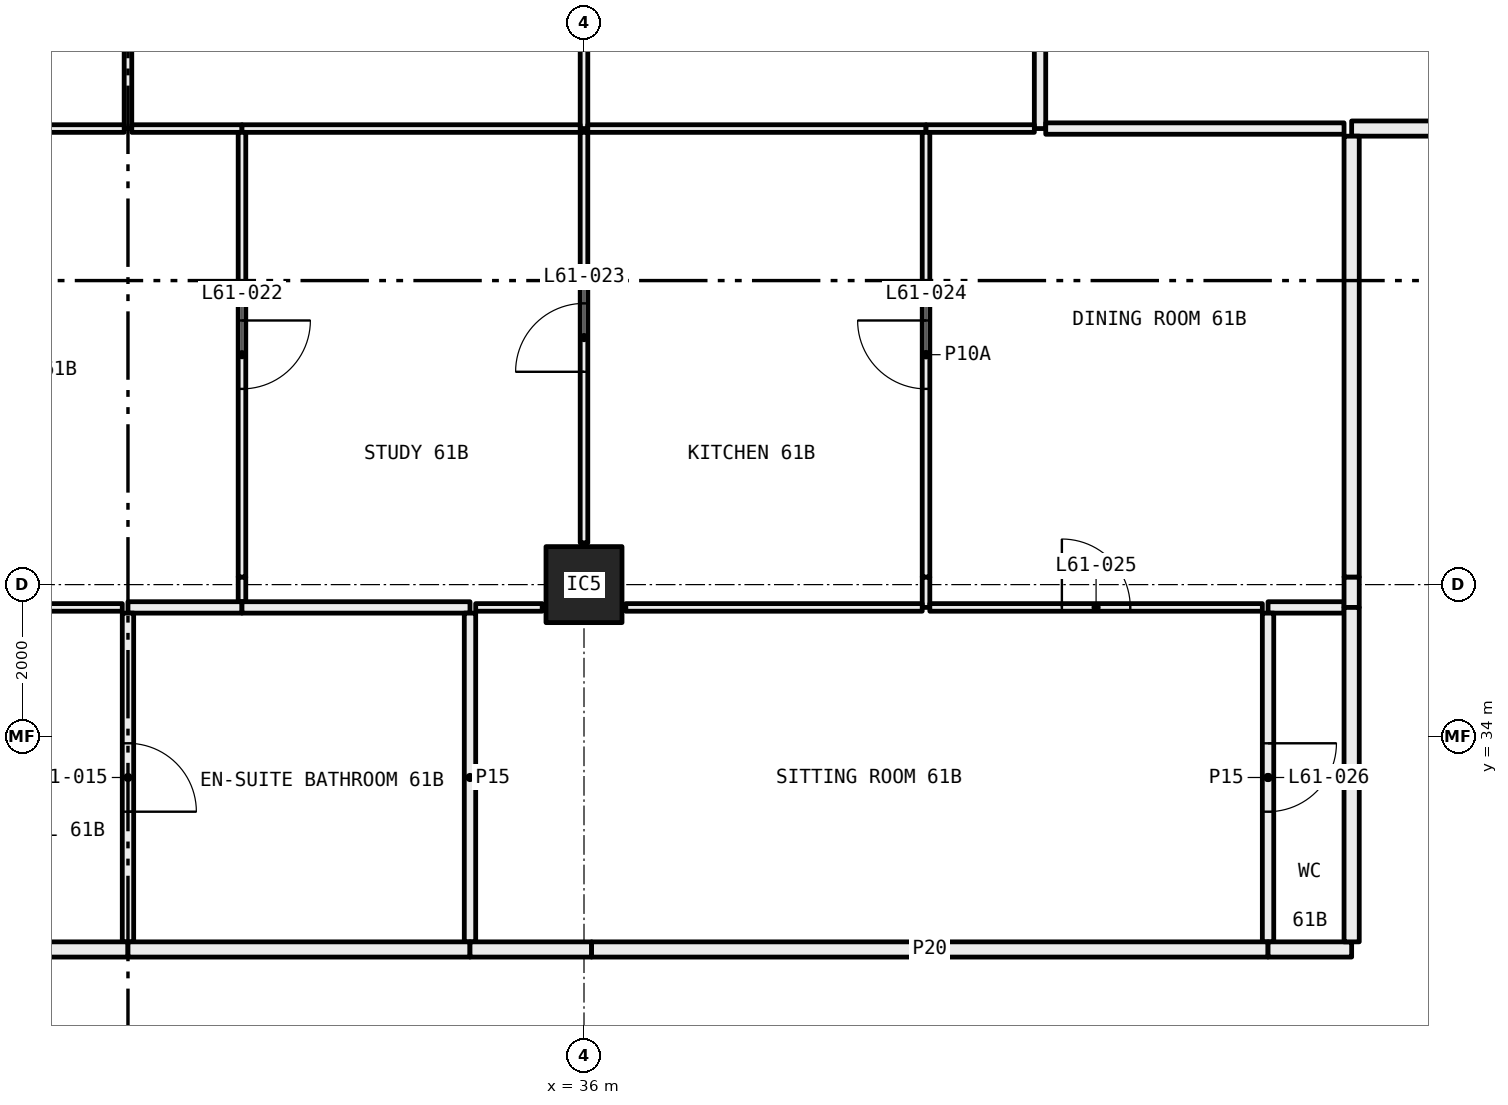
"""IFC4 building model, lengths in metres.
Left out: names, types, materials, properties, quantities, classifications, styles, units other than length and angle.
Written with IfcOpenShell. Run it as: python <this file> out.ifc"""

import sys

from ifc_helpers import new_model, si_unit, direction, frame, frame_2d, origin, origin_2d, place, context, subcontext, project, spatial, rectangle, hollow_rectangle, extrude, element, fill, save


model = new_model("IFC4")
c1 = context("Model", 3, precision=1e-05, world=origin(), true_north=direction((0.0, 1.0)))
c2 = subcontext(c1, "Body", "Model", "MODEL_VIEW")
j1 = project(units=[si_unit("LENGTHUNIT", "METRE"), si_unit("PLANEANGLEUNIT", "RADIAN")], contexts=[c1])
p1 = place(None, origin())
s1 = spatial("IfcSite", under=j1, at=p1, CompositionType="ELEMENT")
p2 = place(p1, origin())
s2 = spatial("IfcBuilding", under=s1, at=p2, CompositionType="ELEMENT")
p3 = place(p2, frame((0.0, 0.0, 228.3)))
s3 = spatial("IfcBuildingStorey", under=s2, at=p3, CompositionType="ELEMENT", Elevation=228.3)
p4 = place(p3, frame((36.0, 36.0, 0.0), z_axis=(0.0, 0.0, 1.0), x_axis=(1.0, 0.0, 0.0)))
e1 = element("IfcColumn", 1, at=p4, inside=s3, PredefinedType="COLUMN", context=c2, shape_type="SweptSolid", body=[
    extrude(hollow_rectangle(XDim=1.0, YDim=1.0, WallThickness=0.04, at=origin_2d()), origin(), (0.0, 0.0, 1.0), 3.05),
])
p5 = place(p3, frame((30.0, 42.0, 0.0), z_axis=(0.0, 0.0, 1.0), x_axis=(0.0, 1.0, 0.0)))
e2 = element("IfcWall", 2, at=p5, inside=s3, PredefinedType="PARTITIONING", context=c2, shape_type="SweptSolid", body=[
    extrude(rectangle(XDim=5.28, YDim=0.1, at=frame_2d((2.64, 0.0))), origin(), (0.0, 0.0, 1.0), 3.05),
])
p6 = place(p5, frame((2.19, 0.0, 0.0)))
e3 = element("IfcOpeningElement", 3, at=p6, cuts=e2, PredefinedType="OPENING", context=c2, shape_type="SweptSolid", body=[
    extrude(rectangle(XDim=0.9, YDim=2.1, at=frame_2d((0.45, 1.05))), frame((0.0, 0.06, 0.0), z_axis=(0.0, -1.0, 0.0), x_axis=(1.0, 0.0, 0.0)), (0.0, 0.0, 1.0), 0.12),
])
p7 = place(p3, frame((26.0, 42.0, 0.0), z_axis=(0.0, 0.0, 1.0), x_axis=(1.0, 0.0, 0.0)))
e4 = element("IfcWall", 4, at=p7, inside=s3, PredefinedType="PARTITIONING", context=c2, shape_type="SweptSolid", body=[
    extrude(rectangle(XDim=3.95, YDim=0.1, at=frame_2d((1.975, 0.0))), origin(), (0.0, 0.0, 1.0), 3.05),
])
p8 = place(p7, frame((1.525, 0.0, 0.0)))
e5 = element("IfcOpeningElement", 5, at=p8, cuts=e4, PredefinedType="OPENING", context=c2, shape_type="SweptSolid", body=[
    extrude(rectangle(XDim=0.9, YDim=2.1, at=frame_2d((0.45, 1.05))), frame((0.0, 0.06, 0.0), z_axis=(0.0, -1.0, 0.0), x_axis=(1.0, 0.0, 0.0)), (0.0, 0.0, 1.0), 0.12),
])
p9 = place(p3, frame((36.0, 42.0, 0.0), z_axis=(0.0, 0.0, 1.0), x_axis=(0.0, 1.0, 0.0)))
e6 = element("IfcWall", 6, at=p9, inside=s3, PredefinedType="PARTITIONING", context=c2, shape_type="SweptSolid", body=[
    extrude(rectangle(XDim=5.28, YDim=0.1, at=frame_2d((2.64, 0.0))), origin(), (0.0, 0.0, 1.0), 2.45),
])
p10 = place(p9, frame((2.19, 0.0, 0.0)))
e7 = element("IfcOpeningElement", 7, at=p10, cuts=e6, PredefinedType="OPENING", context=c2, shape_type="SweptSolid", body=[
    extrude(rectangle(XDim=0.9, YDim=2.1, at=frame_2d((0.45, 1.05))), frame((0.0, 0.06, 0.0), z_axis=(0.0, -1.0, 0.0), x_axis=(1.0, 0.0, 0.0)), (0.0, 0.0, 1.0), 0.12),
])
p11 = place(p3, frame((30.05, 42.0, 0.0), z_axis=(0.0, 0.0, 1.0), x_axis=(1.0, 0.0, 0.0)))
e8 = element("IfcWall", 8, at=p11, inside=s3, PredefinedType="PARTITIONING", context=c2, shape_type="SweptSolid", body=[
    extrude(rectangle(XDim=1.45, YDim=0.1, at=frame_2d((0.725, 0.0))), origin(), (0.0, 0.0, 1.0), 3.05),
])
p12 = place(p3, frame((31.5, 42.0, 0.0), z_axis=(0.0, 0.0, 1.0), x_axis=(1.0, 0.0, 0.0)))
e9 = element("IfcWall", 9, at=p12, inside=s3, PredefinedType="PARTITIONING", context=c2, shape_type="SweptSolid", body=[
    extrude(rectangle(XDim=4.45, YDim=0.1, at=frame_2d((2.225, 0.0))), origin(), (0.0, 0.0, 1.0), 2.45),
])
p13 = place(p3, frame((42.0, 42.0, 0.0), z_axis=(0.0, 0.0, 1.0), x_axis=(0.0, 1.0, 0.0)))
e10 = element("IfcWall", 10, at=p13, inside=s3, PredefinedType="PARTITIONING", context=c2, shape_type="SweptSolid", body=[
    extrude(rectangle(XDim=3.0, YDim=0.15, at=frame_2d((1.5, 0.0))), origin(), (0.0, 0.0, 1.0), 3.05),
])
p14 = place(p13, frame((1.05, 0.0, 0.0)))
e11 = element("IfcOpeningElement", 11, at=p14, cuts=e10, PredefinedType="OPENING", context=c2, shape_type="SweptSolid", body=[
    extrude(rectangle(XDim=0.9, YDim=2.1, at=frame_2d((0.45, 1.05))), frame((0.0, 0.085, 0.0), z_axis=(0.0, -1.0, 0.0), x_axis=(1.0, 0.0, 0.0)), (0.0, 0.0, 1.0), 0.17),
])
p15 = place(p3, frame((36.05, 42.0, 0.0), z_axis=(0.0, 0.0, 1.0), x_axis=(1.0, 0.0, 0.0)))
e12 = element("IfcWall", 12, at=p15, inside=s3, PredefinedType="PARTITIONING", context=c2, shape_type="SweptSolid", body=[
    extrude(rectangle(XDim=4.45, YDim=0.1, at=frame_2d((2.225, 0.0))), origin(), (0.0, 0.0, 1.0), 2.45),
])
p16 = place(p3, frame((40.5, 42.0, 0.0), z_axis=(0.0, 0.0, 1.0), x_axis=(1.0, 0.0, 0.0)))
e13 = element("IfcWall", 13, at=p16, inside=s3, PredefinedType="PARTITIONING", context=c2, shape_type="SweptSolid", body=[
    extrude(rectangle(XDim=1.425, YDim=0.1, at=frame_2d((0.712, 0.0))), origin(), (0.0, 0.0, 1.0), 3.05),
])
p17 = place(p3, frame((42.075, 42.0, 0.0), z_axis=(0.0, 0.0, 1.0), x_axis=(1.0, 0.0, 0.0)))
e14 = element("IfcWall", 14, at=p17, inside=s3, PredefinedType="PARTITIONING", context=c2, shape_type="SweptSolid", body=[
    extrude(rectangle(XDim=3.925, YDim=0.15, at=frame_2d((1.962, 0.0))), origin(), (0.0, 0.0, 1.0), 3.05),
])
p18 = place(p3, frame((46.1, 42.0, 0.0), z_axis=(0.0, 0.0, 1.0), x_axis=(1.0, 0.0, 0.0)))
e15 = element("IfcWall", 15, at=p18, inside=s3, PredefinedType="PARTITIONING", context=c2, shape_type="SweptSolid", body=[
    extrude(rectangle(XDim=1.8, YDim=0.2, at=frame_2d((0.9, 0.0))), origin(), (0.0, 0.0, 1.0), 3.05),
])
p19 = place(p3, frame((31.5, 35.775, 0.0), z_axis=(0.0, 0.0, 1.0), x_axis=(0.0, 1.0, 0.0)))
e16 = element("IfcWall", 16, at=p19, inside=s3, PredefinedType="PARTITIONING", context=c2, shape_type="SweptSolid", body=[
    extrude(rectangle(XDim=0.325, YDim=0.1, at=frame_2d((0.163, 0.0))), origin(), (0.0, 0.0, 1.0), 2.45),
])
p20 = place(p3, frame((31.5, 36.1, 0.0), z_axis=(0.0, 0.0, 1.0), x_axis=(0.0, 1.0, 0.0)))
e17 = element("IfcWall", 17, at=p20, inside=s3, PredefinedType="PARTITIONING", context=c2, shape_type="SweptSolid", body=[
    extrude(rectangle(XDim=5.85, YDim=0.1, at=frame_2d((2.925, 0.0))), origin(), (0.0, 0.0, 1.0), 3.05),
])
p21 = place(p20, frame((2.475, 0.0, 0.0)))
e18 = element("IfcOpeningElement", 18, at=p21, cuts=e17, PredefinedType="OPENING", context=c2, shape_type="SweptSolid", body=[
    extrude(rectangle(XDim=0.9, YDim=2.1, at=frame_2d((0.45, 1.05))), frame((0.0, 0.06, 0.0), z_axis=(0.0, -1.0, 0.0), x_axis=(1.0, 0.0, 0.0)), (0.0, 0.0, 1.0), 0.12),
])
p22 = place(p3, frame((26.0, 35.7, 0.0), z_axis=(0.0, 0.0, 1.0), x_axis=(1.0, 0.0, 0.0)))
e19 = element("IfcWall", 19, at=p22, inside=s3, PredefinedType="PARTITIONING", context=c2, shape_type="SweptSolid", body=[
    extrude(rectangle(XDim=3.925, YDim=0.1, at=frame_2d((1.962, 0.0))), origin(), (0.0, 0.0, 1.0), 3.05),
])
p23 = place(p22, frame((1.512, 0.0, 0.0)))
e20 = element("IfcOpeningElement", 20, at=p23, cuts=e19, PredefinedType="OPENING", context=c2, shape_type="SweptSolid", body=[
    extrude(rectangle(XDim=0.9, YDim=2.1, at=frame_2d((0.45, 1.05))), frame((0.0, 0.06, 0.0), z_axis=(0.0, -1.0, 0.0), x_axis=(1.0, 0.0, 0.0)), (0.0, 0.0, 1.0), 0.12),
])
p24 = place(p3, frame((30.0, 35.7, 0.0), z_axis=(0.0, 0.0, 1.0), x_axis=(1.0, 0.0, 0.0)))
e21 = element("IfcWall", 21, at=p24, inside=s3, PredefinedType="PARTITIONING", context=c2, shape_type="SweptSolid", body=[
    extrude(rectangle(XDim=1.5, YDim=0.15, at=frame_2d((0.75, 0.0))), origin(), (0.0, 0.0, 1.0), 3.05),
])
p25 = place(p3, frame((36.0, 36.55, 0.0), z_axis=(0.0, 0.0, 1.0), x_axis=(0.0, 1.0, 0.0)))
e22 = element("IfcWall", 22, at=p25, inside=s3, PredefinedType="PARTITIONING", context=c2, shape_type="SweptSolid", body=[
    extrude(rectangle(XDim=5.4, YDim=0.1, at=frame_2d((2.7, 0.0))), origin(), (0.0, 0.0, 1.0), 2.45),
])
p26 = place(p25, frame((2.25, 0.0, 0.0)))
e23 = element("IfcOpeningElement", 23, at=p26, cuts=e22, PredefinedType="OPENING", context=c2, shape_type="SweptSolid", body=[
    extrude(rectangle(XDim=0.9, YDim=2.1, at=frame_2d((0.45, 1.05))), frame((0.0, 0.06, 0.0), z_axis=(0.0, -1.0, 0.0), x_axis=(1.0, 0.0, 0.0)), (0.0, 0.0, 1.0), 0.12),
])
p27 = place(p3, frame((31.5, 35.7, 0.0), z_axis=(0.0, 0.0, 1.0), x_axis=(1.0, 0.0, 0.0)))
e24 = element("IfcWall", 24, at=p27, inside=s3, PredefinedType="PARTITIONING", context=c2, shape_type="SweptSolid", body=[
    extrude(rectangle(XDim=3.0, YDim=0.15, at=frame_2d((1.5, 0.0))), origin(), (0.0, 0.0, 1.0), 3.05),
])
p28 = place(p3, frame((34.575, 35.7, 0.0), z_axis=(0.0, 0.0, 1.0), x_axis=(1.0, 0.0, 0.0)))
e25 = element("IfcWall", 25, at=p28, inside=s3, PredefinedType="PARTITIONING", context=c2, shape_type="SweptSolid", body=[
    extrude(rectangle(XDim=0.875, YDim=0.1, at=frame_2d((0.438, 0.0))), origin(), (0.0, 0.0, 1.0), 3.05),
])
p29 = place(p3, frame((40.5, 35.7, 0.0), z_axis=(0.0, 0.0, 1.0), x_axis=(0.0, 1.0, 0.0)))
e26 = element("IfcWall", 26, at=p29, inside=s3, PredefinedType="PARTITIONING", context=c2, shape_type="SweptSolid", body=[
    extrude(rectangle(XDim=0.4, YDim=0.1, at=frame_2d((0.2, 0.0))), origin(), (0.0, 0.0, 1.0), 2.45),
])
p30 = place(p3, frame((40.5, 36.1, 0.0), z_axis=(0.0, 0.0, 1.0), x_axis=(0.0, 1.0, 0.0)))
e27 = element("IfcWall", 27, at=p30, inside=s3, PredefinedType="PARTITIONING", context=c2, shape_type="SweptSolid", body=[
    extrude(rectangle(XDim=5.85, YDim=0.1, at=frame_2d((2.925, 0.0))), origin(), (0.0, 0.0, 1.0), 3.05),
])
p31 = place(p30, frame((2.475, 0.0, 0.0)))
e28 = element("IfcOpeningElement", 28, at=p31, cuts=e27, PredefinedType="OPENING", context=c2, shape_type="SweptSolid", body=[
    extrude(rectangle(XDim=0.9, YDim=2.1, at=frame_2d((0.45, 1.05))), frame((0.0, 0.06, 0.0), z_axis=(0.0, -1.0, 0.0), x_axis=(1.0, 0.0, 0.0)), (0.0, 0.0, 1.0), 0.12),
])
p32 = place(p3, frame((36.55, 35.7, 0.0), z_axis=(0.0, 0.0, 1.0), x_axis=(1.0, 0.0, 0.0)))
e29 = element("IfcWall", 29, at=p32, inside=s3, PredefinedType="PARTITIONING", context=c2, shape_type="SweptSolid", body=[
    extrude(rectangle(XDim=3.9, YDim=0.1, at=frame_2d((1.95, 0.0))), origin(), (0.0, 0.0, 1.0), 3.05),
])
p33 = place(p3, frame((40.55, 35.7, 0.0), z_axis=(0.0, 0.0, 1.0), x_axis=(1.0, 0.0, 0.0)))
e30 = element("IfcWall", 30, at=p33, inside=s3, PredefinedType="PARTITIONING", context=c2, shape_type="SweptSolid", body=[
    extrude(rectangle(XDim=4.375, YDim=0.1, at=frame_2d((2.188, 0.0))), origin(), (0.0, 0.0, 1.0), 3.05),
])
p34 = place(p33, frame((1.738, 0.0, 0.0)))
e31 = element("IfcOpeningElement", 31, at=p34, cuts=e30, PredefinedType="OPENING", context=c2, shape_type="SweptSolid", body=[
    extrude(rectangle(XDim=0.9, YDim=2.1, at=frame_2d((0.45, 1.05))), frame((0.0, 0.06, 0.0), z_axis=(0.0, -1.0, 0.0), x_axis=(1.0, 0.0, 0.0)), (0.0, 0.0, 1.0), 0.12),
])
p35 = place(p3, frame((45.0, 35.7, 0.0), z_axis=(0.0, 0.0, 1.0), x_axis=(1.0, 0.0, 0.0)))
e32 = element("IfcWall", 32, at=p35, inside=s3, PredefinedType="PARTITIONING", context=c2, shape_type="SweptSolid", body=[
    extrude(rectangle(XDim=1.0, YDim=0.15, at=frame_2d((0.5, 0.0))), origin(), (0.0, 0.0, 1.0), 3.05),
])
p36 = place(p3, frame((46.1, 35.7, 0.0), z_axis=(0.0, 0.0, 1.0), x_axis=(0.0, 1.0, 0.0)))
e33 = element("IfcWall", 33, at=p36, inside=s3, PredefinedType="PARTITIONING", context=c2, shape_type="SweptSolid", body=[
    extrude(rectangle(XDim=0.4, YDim=0.2, at=frame_2d((0.2, 0.0))), origin(), (0.0, 0.0, 1.0), 2.45),
])
p37 = place(p3, frame((46.1, 36.1, 0.0), z_axis=(0.0, 0.0, 1.0), x_axis=(0.0, 1.0, 0.0)))
e34 = element("IfcWall", 34, at=p37, inside=s3, PredefinedType="PARTITIONING", context=c2, shape_type="SweptSolid", body=[
    extrude(rectangle(XDim=5.8, YDim=0.2, at=frame_2d((2.9, 0.0))), origin(), (0.0, 0.0, 1.0), 3.05),
])
p38 = place(p3, frame((30.0, 31.3, 0.0), z_axis=(0.0, 0.0, 1.0), x_axis=(0.0, 1.0, 0.0)))
e35 = element("IfcWall", 35, at=p38, inside=s3, PredefinedType="PARTITIONING", context=c2, shape_type="SweptSolid", body=[
    extrude(rectangle(XDim=4.325, YDim=0.15, at=frame_2d((2.163, 0.0))), origin(), (0.0, 0.0, 1.0), 3.05),
])
p39 = place(p38, frame((1.712, 0.0, 0.0)))
e36 = element("IfcOpeningElement", 36, at=p39, cuts=e35, PredefinedType="OPENING", context=c2, shape_type="SweptSolid", body=[
    extrude(rectangle(XDim=0.9, YDim=2.1, at=frame_2d((0.45, 1.05))), frame((0.0, 0.085, 0.0), z_axis=(0.0, -1.0, 0.0), x_axis=(1.0, 0.0, 0.0)), (0.0, 0.0, 1.0), 0.17),
])
p40 = place(p3, frame((26.0, 31.2, 0.0), z_axis=(0.0, 0.0, 1.0), x_axis=(1.0, 0.0, 0.0)))
e37 = element("IfcWall", 37, at=p40, inside=s3, PredefinedType="PARTITIONING", context=c2, shape_type="SweptSolid", body=[
    extrude(rectangle(XDim=4.0, YDim=0.2, at=frame_2d((2.0, 0.0))), origin(), (0.0, 0.0, 1.0), 3.05),
])
p41 = place(p3, frame((34.5, 31.3, 0.0), z_axis=(0.0, 0.0, 1.0), x_axis=(0.0, 1.0, 0.0)))
e38 = element("IfcWall", 38, at=p41, inside=s3, PredefinedType="PARTITIONING", context=c2, shape_type="SweptSolid", body=[
    extrude(rectangle(XDim=4.325, YDim=0.15, at=frame_2d((2.163, 0.0))), origin(), (0.0, 0.0, 1.0), 3.05),
])
p42 = place(p3, frame((30.0, 31.2, 0.0), z_axis=(0.0, 0.0, 1.0), x_axis=(1.0, 0.0, 0.0)))
e39 = element("IfcWall", 39, at=p42, inside=s3, PredefinedType="PARTITIONING", context=c2, shape_type="SweptSolid", body=[
    extrude(rectangle(XDim=4.5, YDim=0.2, at=frame_2d((2.25, 0.0))), origin(), (0.0, 0.0, 1.0), 3.05),
])
p43 = place(p3, frame((45.0, 31.3, 0.0), z_axis=(0.0, 0.0, 1.0), x_axis=(0.0, 1.0, 0.0)))
e40 = element("IfcWall", 40, at=p43, inside=s3, PredefinedType="PARTITIONING", context=c2, shape_type="SweptSolid", body=[
    extrude(rectangle(XDim=4.325, YDim=0.15, at=frame_2d((2.163, 0.0))), origin(), (0.0, 0.0, 1.0), 3.05),
])
p44 = place(p43, frame((1.712, 0.0, 0.0)))
e41 = element("IfcOpeningElement", 41, at=p44, cuts=e40, PredefinedType="OPENING", context=c2, shape_type="SweptSolid", body=[
    extrude(rectangle(XDim=0.9, YDim=2.1, at=frame_2d((0.45, 1.05))), frame((0.0, 0.085, 0.0), z_axis=(0.0, -1.0, 0.0), x_axis=(1.0, 0.0, 0.0)), (0.0, 0.0, 1.0), 0.17),
])
p45 = place(p3, frame((34.5, 31.2, 0.0), z_axis=(0.0, 0.0, 1.0), x_axis=(1.0, 0.0, 0.0)))
e42 = element("IfcWall", 42, at=p45, inside=s3, PredefinedType="PARTITIONING", context=c2, shape_type="SweptSolid", body=[
    extrude(rectangle(XDim=1.6, YDim=0.2, at=frame_2d((0.8, 0.0))), origin(), (0.0, 0.0, 1.0), 2.45),
])
p46 = place(p3, frame((36.1, 31.2, 0.0), z_axis=(0.0, 0.0, 1.0), x_axis=(1.0, 0.0, 0.0)))
e43 = element("IfcWall", 43, at=p46, inside=s3, PredefinedType="PARTITIONING", context=c2, shape_type="SweptSolid", body=[
    extrude(rectangle(XDim=8.9, YDim=0.2, at=frame_2d((4.45, 0.0))), origin(), (0.0, 0.0, 1.0), 3.05),
])
p47 = place(p3, frame((45.0, 31.2, 0.0), z_axis=(0.0, 0.0, 1.0), x_axis=(1.0, 0.0, 0.0)))
e44 = element("IfcWall", 44, at=p47, inside=s3, PredefinedType="PARTITIONING", context=c2, shape_type="SweptSolid", body=[
    extrude(rectangle(XDim=1.1, YDim=0.2, at=frame_2d((0.55, 0.0))), origin(), (0.0, 0.0, 1.0), 3.05),
])
p48 = place(p3, frame((46.1, 31.3, 0.0), z_axis=(0.0, 0.0, 1.0), x_axis=(0.0, 1.0, 0.0)))
e45 = element("IfcWall", 45, at=p48, inside=s3, PredefinedType="PARTITIONING", context=c2, shape_type="SweptSolid", body=[
    extrude(rectangle(XDim=4.4, YDim=0.2, at=frame_2d((2.2, 0.0))), origin(), (0.0, 0.0, 1.0), 3.05),
])
p49 = place(p39, frame((0.9, 0.0, 0.0), x_axis=(-1.0, 0.0, 0.0)))
e46 = element("IfcDoor", 46, at=p49, inside=s3, OperationType="SINGLE_SWING_LEFT", PredefinedType="DOOR", context=c2, shape_type="SweptSolid", body=[
    extrude(rectangle(XDim=0.9, YDim=2.1, at=frame_2d((0.45, 1.05))), frame((0.0, 0.025, 0.0), z_axis=(0.0, -1.0, 0.0), x_axis=(1.0, 0.0, 0.0)), (0.0, 0.0, 1.0), 0.05),
])
fill(e36, e46)
p50 = place(p21, frame((0.9, 0.0, 0.0), x_axis=(-1.0, 0.0, 0.0)))
e47 = element("IfcDoor", 47, at=p50, inside=s3, OperationType="SINGLE_SWING_RIGHT", PredefinedType="DOOR", context=c2, shape_type="SweptSolid", body=[
    extrude(rectangle(XDim=0.9, YDim=2.1, at=frame_2d((0.45, 1.05))), frame((0.0, 0.025, 0.0), z_axis=(0.0, -1.0, 0.0), x_axis=(1.0, 0.0, 0.0)), (0.0, 0.0, 1.0), 0.05),
])
fill(e18, e47)
p51 = place(p26, origin())
e48 = element("IfcDoor", 48, at=p51, inside=s3, OperationType="SINGLE_SWING_RIGHT", PredefinedType="DOOR", context=c2, shape_type="SweptSolid", body=[
    extrude(rectangle(XDim=0.9, YDim=2.1, at=frame_2d((0.45, 1.05))), frame((0.0, 0.025, 0.0), z_axis=(0.0, -1.0, 0.0), x_axis=(1.0, 0.0, 0.0)), (0.0, 0.0, 1.0), 0.05),
])
fill(e23, e48)
p52 = place(p31, origin())
e49 = element("IfcDoor", 49, at=p52, inside=s3, OperationType="SINGLE_SWING_LEFT", PredefinedType="DOOR", context=c2, shape_type="SweptSolid", body=[
    extrude(rectangle(XDim=0.9, YDim=2.1, at=frame_2d((0.45, 1.05))), frame((0.0, 0.025, 0.0), z_axis=(0.0, -1.0, 0.0), x_axis=(1.0, 0.0, 0.0)), (0.0, 0.0, 1.0), 0.05),
])
fill(e28, e49)
p53 = place(p34, origin())
e50 = element("IfcDoor", 50, at=p53, inside=s3, OperationType="SINGLE_SWING_RIGHT", PredefinedType="DOOR", context=c2, shape_type="SweptSolid", body=[
    extrude(rectangle(XDim=0.9, YDim=2.1, at=frame_2d((0.45, 1.05))), frame((0.0, 0.025, 0.0), z_axis=(0.0, -1.0, 0.0), x_axis=(1.0, 0.0, 0.0)), (0.0, 0.0, 1.0), 0.05),
])
fill(e31, e50)
p54 = place(p44, frame((0.9, 0.0, 0.0), x_axis=(-1.0, 0.0, 0.0)))
e51 = element("IfcDoor", 51, at=p54, inside=s3, OperationType="SINGLE_SWING_RIGHT", PredefinedType="DOOR", context=c2, shape_type="SweptSolid", body=[
    extrude(rectangle(XDim=0.9, YDim=2.1, at=frame_2d((0.45, 1.05))), frame((0.0, 0.025, 0.0), z_axis=(0.0, -1.0, 0.0), x_axis=(1.0, 0.0, 0.0)), (0.0, 0.0, 1.0), 0.05),
])
fill(e41, e51)
save(model, sys.argv[1])
